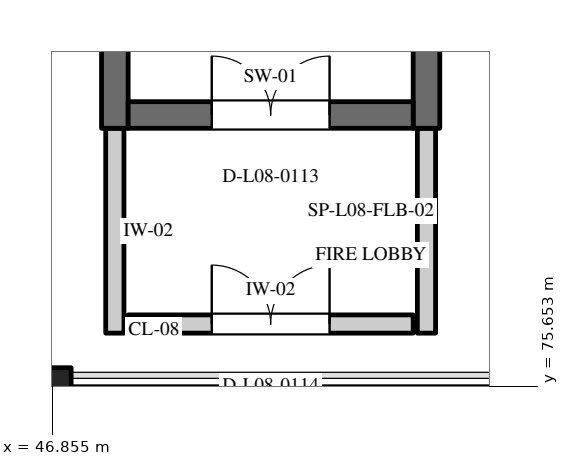
"""IFC4 building model, lengths in metres.
Left out: names, types, materials, properties, quantities, classifications, styles, units other than length and angle.
Written with IfcOpenShell. Run it as: python <this file> out.ifc"""

import sys

from ifc_helpers import new_model, si_unit, direction, frame, frame_2d, origin, origin_2d, place, context, subcontext, project, spatial, rectangle, extrude, element, fill, save


model = new_model("IFC4")
c1 = context("Model", 3, precision=1e-05, world=origin(), true_north=direction((0.0, 1.0)))
c2 = subcontext(c1, "Body", "Model", "MODEL_VIEW")
j1 = project(units=[si_unit("LENGTHUNIT", "METRE"), si_unit("PLANEANGLEUNIT", "RADIAN")], contexts=[c1])
p1 = place(None, origin())
s1 = spatial("IfcSite", under=j1, at=p1, CompositionType="ELEMENT")
p2 = place(p1, origin())
s2 = spatial("IfcBuilding", under=s1, at=p2, CompositionType="ELEMENT")
p3 = place(p2, frame((0.0, 0.0, 33.9)))
s3 = spatial("IfcBuildingStorey", under=s2, at=p3, CompositionType="ELEMENT", Elevation=33.9)
p4 = place(p3, frame((46.8, 75.6, 0.0), z_axis=(0.0, 0.0, 1.0), x_axis=(1.0, 0.0, 0.0)))
e1 = element("IfcColumn", 1, at=p4, inside=s3, PredefinedType="COLUMN", context=c2, shape_type="SweptSolid", body=[
    extrude(rectangle(XDim=0.6, YDim=0.6, at=origin_2d()), origin(), (0.0, 0.0, 1.0), 3.9),
])
for number, where, z_axis, x_axis in (
    (2, (47.675, 79.05, 0.0), (0.0, 0.0, 1.0), (0.0, 1.0, 0.0)),
    (3, (51.775, 79.05, 0.0), (0.0, 0.0, 1.0), (0.0, 1.0, 0.0)),
):
    element("IfcWall", number, at=place(p3, frame(where, z_axis=z_axis, x_axis=x_axis)), inside=s3, PredefinedType="SHEAR", context=c2, shape_type="SweptSolid", body=[
        extrude(rectangle(XDim=10.5, YDim=0.35, at=frame_2d((5.25, 0.0))), origin(), (0.0, 0.0, 1.0), 3.6),
    ])
p5 = place(p3, frame((47.85, 79.225, 0.0), z_axis=(0.0, 0.0, 1.0), x_axis=(1.0, 0.0, 0.0)))
e4 = element("IfcWall", 4, at=p5, inside=s3, PredefinedType="SHEAR", context=c2, shape_type="SweptSolid", body=[
    extrude(rectangle(XDim=3.75, YDim=0.35, at=frame_2d((1.875, 0.0))), origin(), (0.0, 0.0, 1.0), 3.6),
])
p6 = place(p5, frame((1.1, 0.0, 0.0)))
e5 = element("IfcOpeningElement", 5, at=p6, cuts=e4, PredefinedType="OPENING", context=c2, shape_type="SweptSolid", body=[
    extrude(rectangle(XDim=1.55, YDim=2.25, at=frame_2d((0.775, 1.125))), frame((0.0, 0.187, 0.0), z_axis=(0.0, -1.0, 0.0), x_axis=(1.0, 0.0, 0.0)), (0.0, 0.0, 1.0), 0.374),
])
for number, where, z_axis, x_axis in (
    (6, (47.675, 76.355, 0.0), (0.0, 0.0, 1.0), (0.0, 1.0, 0.0)),
    (7, (51.775, 76.355, 0.0), (0.0, 0.0, 1.0), (0.0, 1.0, 0.0)),
):
    element("IfcWall", number, at=place(p3, frame(where, z_axis=z_axis, x_axis=x_axis)), inside=s3, PredefinedType="STANDARD", context=c2, shape_type="SweptSolid", body=[
        extrude(rectangle(XDim=2.695, YDim=0.24, at=frame_2d((1.348, 0.0))), origin(), (0.0, 0.0, 1.0), 3.6),
    ])
p7 = place(p3, frame((47.85, 76.475, 0.0), z_axis=(0.0, 0.0, 1.0), x_axis=(1.0, 0.0, 0.0)))
e8 = element("IfcWall", 8, at=p7, inside=s3, PredefinedType="STANDARD", context=c2, shape_type="SweptSolid", body=[
    extrude(rectangle(XDim=3.75, YDim=0.24, at=frame_2d((1.875, 0.0))), origin(), (0.0, 0.0, 1.0), 3.6),
])
p8 = place(p7, frame((1.1, 0.0, 0.0)))
e9 = element("IfcOpeningElement", 9, at=p8, cuts=e8, PredefinedType="OPENING", context=c2, shape_type="SweptSolid", body=[
    extrude(rectangle(XDim=1.55, YDim=2.25, at=frame_2d((0.775, 1.125))), frame((0.0, 0.132, 0.0), z_axis=(0.0, -1.0, 0.0), x_axis=(1.0, 0.0, 0.0)), (0.0, 0.0, 1.0), 0.264),
])
p9 = place(p3, frame((46.92, 75.6, 0.0), z_axis=(0.0, 0.0, 1.0), x_axis=(1.0, 0.0, 0.0)))
e10 = element("IfcWall", 10, at=p9, inside=s3, PredefinedType="PARTITIONING", context=c2, shape_type="SweptSolid", body=[
    extrude(rectangle(XDim=7.56, YDim=0.1, at=frame_2d((3.78, 0.0))), origin(), (0.0, 0.0, 1.0), 2.95),
])
p10 = place(p6, origin())
e11 = element("IfcDoor", 11, at=p10, inside=s3, OperationType="DOUBLE_DOOR_SINGLE_SWING", PredefinedType="DOOR", context=c2, shape_type="SweptSolid", body=[
    extrude(rectangle(XDim=1.55, YDim=2.25, at=frame_2d((0.775, 1.125))), frame((0.0, 0.025, 0.0), z_axis=(0.0, -1.0, 0.0), x_axis=(1.0, 0.0, 0.0)), (0.0, 0.0, 1.0), 0.05),
])
fill(e5, e11)
p11 = place(p8, origin())
e12 = element("IfcDoor", 12, at=p11, inside=s3, OperationType="DOUBLE_DOOR_SINGLE_SWING", PredefinedType="DOOR", context=c2, shape_type="SweptSolid", body=[
    extrude(rectangle(XDim=1.55, YDim=2.25, at=frame_2d((0.775, 1.125))), frame((0.0, 0.025, 0.0), z_axis=(0.0, -1.0, 0.0), x_axis=(1.0, 0.0, 0.0)), (0.0, 0.0, 1.0), 0.05),
])
fill(e9, e12)
save(model, sys.argv[1])
